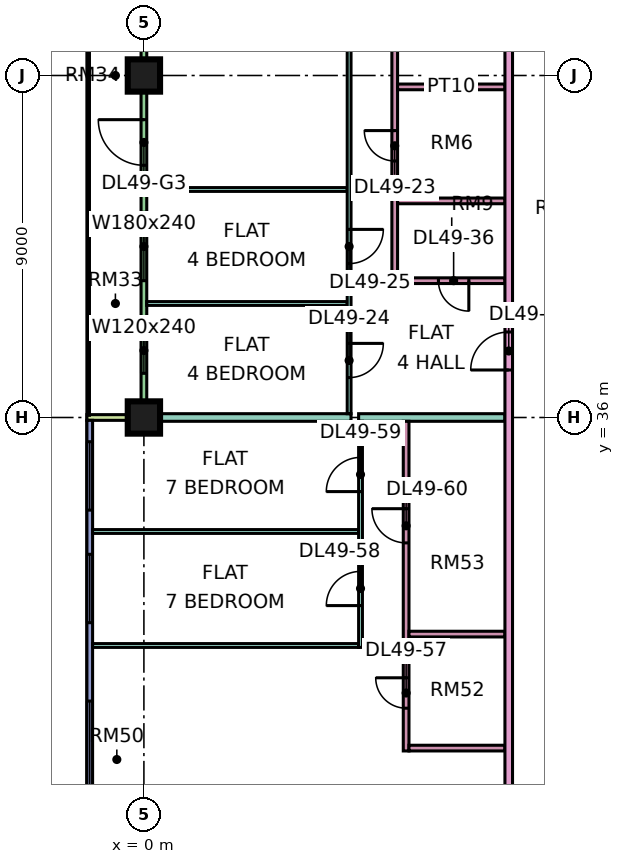
"""IFC4 building model, lengths in metres.
Left out: names, types, materials, properties, quantities, classifications, styles, units other than length and angle.
Written with IfcOpenShell. Run it as: python <this file> out.ifc"""

import sys

from ifc_helpers import new_model, si_unit, direction, frame, frame_2d, origin, origin_2d, place, context, subcontext, project, spatial, rectangle, extrude, element, fill, save


model = new_model("IFC4")
c1 = context("Model", 3, precision=1e-05, world=origin(), true_north=direction((0.0, 1.0)))
c2 = subcontext(c1, "Body", "Model", "MODEL_VIEW")
j1 = project(units=[si_unit("LENGTHUNIT", "METRE"), si_unit("PLANEANGLEUNIT", "RADIAN")], contexts=[c1])
p1 = place(None, origin())
s1 = spatial("IfcSite", under=j1, at=p1, CompositionType="ELEMENT")
p2 = place(p1, origin())
s2 = spatial("IfcBuilding", under=s1, at=p2, CompositionType="ELEMENT")
p3 = place(p2, frame((0.0, 0.0, 211.65)))
s3 = spatial("IfcBuildingStorey", under=s2, at=p3, CompositionType="ELEMENT", Elevation=211.65)
p4 = place(p3, frame((0.0, 36.0, 0.0), z_axis=(0.0, 0.0, 1.0), x_axis=(1.0, 0.0, 0.0)))
e1 = element("IfcColumn", 1, at=p4, inside=s3, PredefinedType="COLUMN", context=c2, shape_type="SweptSolid", body=[
    extrude(rectangle(XDim=0.85, YDim=0.85, at=origin_2d()), origin(), (0.0, 0.0, 1.0), 3.75),
])
p5 = place(p3, frame((0.0, 45.0, 0.0), z_axis=(0.0, 0.0, 1.0), x_axis=(1.0, 0.0, 0.0)))
e2 = element("IfcColumn", 2, at=p5, inside=s3, PredefinedType="COLUMN", context=c2, shape_type="SweptSolid", body=[
    extrude(rectangle(XDim=0.85, YDim=0.85, at=origin_2d()), origin(), (0.0, 0.0, 1.0), 3.75),
])
p6 = place(p3, frame((0.0, 47.925, 0.0), z_axis=(0.0, 0.0, 1.0), x_axis=(0.0, -1.0, 0.0)))
e3 = element("IfcWall", 3, at=p6, inside=s3, PredefinedType="SOLIDWALL", context=c2, shape_type="SweptSolid", body=[
    extrude(rectangle(XDim=11.85, YDim=0.15, at=frame_2d((5.925, 0.0))), origin(), (0.0, 0.0, 1.0), 3.35),
])
p7 = place(p6, frame((0.6, 0.0, 0.45)))
e4 = element("IfcOpeningElement", 4, at=p7, cuts=e3, PredefinedType="OPENING", context=c2, shape_type="SweptSolid", body=[
    extrude(rectangle(XDim=1.2, YDim=2.4, at=frame_2d((0.6, 1.2))), frame((0.0, 0.085, 0.0), z_axis=(0.0, -1.0, 0.0), x_axis=(1.0, 0.0, 0.0)), (0.0, 0.0, 1.0), 0.17),
])
p8 = place(p6, frame((4.087, 0.0, 0.0)))
e5 = element("IfcOpeningElement", 5, at=p8, cuts=e3, PredefinedType="OPENING", context=c2, shape_type="SweptSolid", body=[
    extrude(rectangle(XDim=1.2, YDim=2.4, at=frame_2d((0.6, 1.2))), frame((0.0, 0.085, 0.0), z_axis=(0.0, -1.0, 0.0), x_axis=(1.0, 0.0, 0.0)), (0.0, 0.0, 1.0), 0.17),
])
p9 = place(p6, frame((6.525, 0.0, 0.45)))
e6 = element("IfcOpeningElement", 6, at=p9, cuts=e3, PredefinedType="OPENING", context=c2, shape_type="SweptSolid", body=[
    extrude(rectangle(XDim=1.8, YDim=2.4, at=frame_2d((0.9, 1.2))), frame((0.0, 0.085, 0.0), z_axis=(0.0, -1.0, 0.0), x_axis=(1.0, 0.0, 0.0)), (0.0, 0.0, 1.0), 0.17),
])
p10 = place(p6, frame((9.562, 0.0, 0.45)))
e7 = element("IfcOpeningElement", 7, at=p10, cuts=e3, PredefinedType="OPENING", context=c2, shape_type="SweptSolid", body=[
    extrude(rectangle(XDim=1.2, YDim=2.4, at=frame_2d((0.6, 1.2))), frame((0.0, 0.085, 0.0), z_axis=(0.0, -1.0, 0.0), x_axis=(1.0, 0.0, 0.0)), (0.0, 0.0, 1.0), 0.17),
])
p11 = place(p3, frame((-1.5, 36.0, 0.0), z_axis=(0.0, 0.0, 1.0), x_axis=(1.0, 0.0, 0.0)))
e8 = element("IfcWall", 8, at=p11, inside=s3, PredefinedType="SOLIDWALL", context=c2, shape_type="SweptSolid", body=[
    extrude(rectangle(XDim=1.5, YDim=0.15, at=frame_2d((0.75, 0.0))), origin(), (0.0, 0.0, 1.0), 3.35),
])
p12 = place(p3, frame((-1.425, 35.925, 0.0), z_axis=(0.0, 0.0, 1.0), x_axis=(0.0, -1.0, 0.0)))
e9 = element("IfcWall", 9, at=p12, inside=s3, PredefinedType="SOLIDWALL", context=c2, shape_type="SweptSolid", body=[
    extrude(rectangle(XDim=11.85, YDim=0.15, at=frame_2d((5.925, 0.0))), origin(), (0.0, 0.0, 1.0), 3.35),
])
p13 = place(p12, frame((0.562, 0.0, 0.45)))
e10 = element("IfcOpeningElement", 10, at=p13, cuts=e9, PredefinedType="OPENING", context=c2, shape_type="SweptSolid", body=[
    extrude(rectangle(XDim=1.8, YDim=2.4, at=frame_2d((0.9, 1.2))), frame((0.0, 0.085, 0.0), z_axis=(0.0, -1.0, 0.0), x_axis=(1.0, 0.0, 0.0)), (0.0, 0.0, 1.0), 0.17),
])
p14 = place(p12, frame((3.525, 0.0, 0.45)))
e11 = element("IfcOpeningElement", 11, at=p14, cuts=e9, PredefinedType="OPENING", context=c2, shape_type="SweptSolid", body=[
    extrude(rectangle(XDim=1.8, YDim=2.4, at=frame_2d((0.9, 1.2))), frame((0.0, 0.085, 0.0), z_axis=(0.0, -1.0, 0.0), x_axis=(1.0, 0.0, 0.0)), (0.0, 0.0, 1.0), 0.17),
])
p15 = place(p12, frame((7.387, 0.0, 0.45)))
e12 = element("IfcOpeningElement", 12, at=p15, cuts=e9, PredefinedType="OPENING", context=c2, shape_type="SweptSolid", body=[
    extrude(rectangle(XDim=3.0, YDim=2.4, at=frame_2d((1.5, 1.2))), frame((0.0, 0.085, 0.0), z_axis=(0.0, -1.0, 0.0), x_axis=(1.0, 0.0, 0.0)), (0.0, 0.0, 1.0), 0.17),
])
p16 = place(p3, frame((-1.351, 33.0, 0.0), z_axis=(0.0, 0.0, 1.0), x_axis=(1.0, 0.0, 0.0)))
e13 = element("IfcWall", 13, at=p16, inside=s3, PredefinedType="PARTITIONING", context=c2, shape_type="SweptSolid", body=[
    extrude(rectangle(XDim=7.001, YDim=0.1, at=frame_2d((3.5, 0.0))), origin(), (0.0, 0.0, 1.0), 3.35),
])
p17 = place(p3, frame((-1.35, 30.0, 0.0), z_axis=(0.0, 0.0, 1.0), x_axis=(1.0, 0.0, 0.0)))
e14 = element("IfcWall", 14, at=p17, inside=s3, PredefinedType="PARTITIONING", context=c2, shape_type="SweptSolid", body=[
    extrude(rectangle(XDim=7.0, YDim=0.1, at=frame_2d((3.5, 0.0))), origin(), (0.0, 0.0, 1.0), 3.35),
])
e15 = element("IfcWall", 15, at=p4, inside=s3, PredefinedType="PARTITIONING", context=c2, shape_type="SweptSolid", body=[
    extrude(rectangle(XDim=5.45, YDim=0.2, at=frame_2d((2.725, 0.0))), origin(), (0.0, 0.0, 1.0), 3.35),
])
for number, where, z_axis, x_axis in (
    (16, (0.074, 39.0, 0.0), (0.0, 0.0, 1.0), (1.0, 0.0, 0.0)),
    (17, (0.074, 42.0, 0.0), (0.0, 0.0, 1.0), (1.0, 0.0, 0.0)),
):
    element("IfcWall", number, at=place(p3, frame(where, z_axis=z_axis, x_axis=x_axis)), inside=s3, PredefinedType="PARTITIONING", context=c2, shape_type="SweptSolid", body=[
        extrude(rectangle(XDim=5.276, YDim=0.1, at=frame_2d((2.638, 0.0))), origin(), (0.0, 0.0, 1.0), 3.35),
    ])
p18 = place(p3, frame((5.4, 36.1, 0.0), z_axis=(0.0, 0.0, 1.0), x_axis=(0.0, 1.0, 0.0)))
e18 = element("IfcWall", 18, at=p18, inside=s3, PredefinedType="PARTITIONING", context=c2, shape_type="SweptSolid", body=[
    extrude(rectangle(XDim=26.95, YDim=0.1, at=frame_2d((13.475, 0.0))), origin(), (0.0, 0.0, 1.0), 3.35),
])
p19 = place(p18, frame((0.95, 0.0, 0.0)))
e19 = element("IfcOpeningElement", 19, at=p19, cuts=e18, PredefinedType="OPENING", context=c2, shape_type="SweptSolid", body=[
    extrude(rectangle(XDim=0.9, YDim=2.1, at=frame_2d((0.45, 1.05))), frame((0.0, 0.06, 0.0), z_axis=(0.0, -1.0, 0.0), x_axis=(1.0, 0.0, 0.0)), (0.0, 0.0, 1.0), 0.12),
])
p20 = place(p18, frame((3.95, 0.0, 0.0)))
e20 = element("IfcOpeningElement", 20, at=p20, cuts=e18, PredefinedType="OPENING", context=c2, shape_type="SweptSolid", body=[
    extrude(rectangle(XDim=0.9, YDim=2.1, at=frame_2d((0.45, 1.05))), frame((0.0, 0.06, 0.0), z_axis=(0.0, -1.0, 0.0), x_axis=(1.0, 0.0, 0.0)), (0.0, 0.0, 1.0), 0.12),
])
p21 = place(p18, frame((15.95, 0.0, 0.0)))
e21 = element("IfcOpeningElement", 21, at=p21, cuts=e18, PredefinedType="OPENING", context=c2, shape_type="SweptSolid", body=[
    extrude(rectangle(XDim=0.9, YDim=2.1, at=frame_2d((0.45, 1.05))), frame((0.0, 0.06, 0.0), z_axis=(0.0, -1.0, 0.0), x_axis=(1.0, 0.0, 0.0)), (0.0, 0.0, 1.0), 0.12),
])
p22 = place(p18, frame((18.95, 0.0, 0.0)))
e22 = element("IfcOpeningElement", 22, at=p22, cuts=e18, PredefinedType="OPENING", context=c2, shape_type="SweptSolid", body=[
    extrude(rectangle(XDim=0.9, YDim=2.1, at=frame_2d((0.45, 1.05))), frame((0.0, 0.06, 0.0), z_axis=(0.0, -1.0, 0.0), x_axis=(1.0, 0.0, 0.0)), (0.0, 0.0, 1.0), 0.12),
])
p23 = place(p18, frame((21.95, 0.0, 0.0)))
e23 = element("IfcOpeningElement", 23, at=p23, cuts=e18, PredefinedType="OPENING", context=c2, shape_type="SweptSolid", body=[
    extrude(rectangle(XDim=0.9, YDim=2.1, at=frame_2d((0.45, 1.05))), frame((0.0, 0.06, 0.0), z_axis=(0.0, -1.0, 0.0), x_axis=(1.0, 0.0, 0.0)), (0.0, 0.0, 1.0), 0.12),
])
p24 = place(p18, frame((9.95, 0.0, 0.0)))
e24 = element("IfcOpeningElement", 24, at=p24, cuts=e18, PredefinedType="OPENING", context=c2, shape_type="SweptSolid", body=[
    extrude(rectangle(XDim=0.9, YDim=2.1, at=frame_2d((0.45, 1.05))), frame((0.0, 0.06, 0.0), z_axis=(0.0, -1.0, 0.0), x_axis=(1.0, 0.0, 0.0)), (0.0, 0.0, 1.0), 0.12),
])
p25 = place(p18, frame((24.55, 0.0, 0.0)))
e25 = element("IfcOpeningElement", 25, at=p25, cuts=e18, PredefinedType="OPENING", context=c2, shape_type="SweptSolid", body=[
    extrude(rectangle(XDim=1.6, YDim=2.1, at=frame_2d((0.8, 1.05))), frame((0.0, 0.06, 0.0), z_axis=(0.0, -1.0, 0.0), x_axis=(1.0, 0.0, 0.0)), (0.0, 0.0, 1.0), 0.12),
])
p26 = place(p3, frame((5.65, 36.0, 0.0), z_axis=(0.0, 0.0, 1.0), x_axis=(1.0, 0.0, 0.0)))
e26 = element("IfcWall", 26, at=p26, inside=s3, PredefinedType="PARTITIONING", context=c2, shape_type="SweptSolid", body=[
    extrude(rectangle(XDim=3.85, YDim=0.2, at=frame_2d((1.925, 0.0))), origin(), (0.0, 0.0, 1.0), 3.35),
])
p27 = place(p3, frame((5.7, 29.95, 0.0), z_axis=(0.0, 0.0, 1.0), x_axis=(0.0, 1.0, 0.0)))
e27 = element("IfcWall", 27, at=p27, inside=s3, PredefinedType="PARTITIONING", context=c2, shape_type="SweptSolid", body=[
    extrude(rectangle(XDim=5.95, YDim=0.1, at=frame_2d((2.975, 0.0))), origin(), (0.0, 0.0, 1.0), 3.35),
])
p28 = place(p27, frame((1.1, 0.0, 0.0)))
e28 = element("IfcOpeningElement", 28, at=p28, cuts=e27, PredefinedType="OPENING", context=c2, shape_type="SweptSolid", body=[
    extrude(rectangle(XDim=0.9, YDim=2.1, at=frame_2d((0.45, 1.05))), frame((0.0, 0.06, 0.0), z_axis=(0.0, -1.0, 0.0), x_axis=(1.0, 0.0, 0.0)), (0.0, 0.0, 1.0), 0.12),
])
p29 = place(p27, frame((4.1, 0.0, 0.0)))
e29 = element("IfcOpeningElement", 29, at=p29, cuts=e27, PredefinedType="OPENING", context=c2, shape_type="SweptSolid", body=[
    extrude(rectangle(XDim=0.9, YDim=2.1, at=frame_2d((0.45, 1.05))), frame((0.0, 0.06, 0.0), z_axis=(0.0, -1.0, 0.0), x_axis=(1.0, 0.0, 0.0)), (0.0, 0.0, 1.0), 0.12),
])
p30 = place(p3, frame((6.6, 39.525, 0.0), z_axis=(0.0, 0.0, 1.0), x_axis=(0.0, 1.0, 0.0)))
e30 = element("IfcWall", 30, at=p30, inside=s3, PredefinedType="PARTITIONING", context=c2, shape_type="SweptSolid", body=[
    extrude(rectangle(XDim=24.825, YDim=0.15, at=frame_2d((12.413, 0.0))), origin(), (0.0, 0.0, 1.0), 3.35),
])
p31 = place(p30, frame((3.225, 0.0, 0.0)))
e31 = element("IfcOpeningElement", 31, at=p31, cuts=e30, PredefinedType="OPENING", context=c2, shape_type="SweptSolid", body=[
    extrude(rectangle(XDim=0.8, YDim=2.1, at=frame_2d((0.4, 1.05))), frame((0.0, 0.085, 0.0), z_axis=(0.0, -1.0, 0.0), x_axis=(1.0, 0.0, 0.0)), (0.0, 0.0, 1.0), 0.17),
])
p32 = place(p30, frame((13.875, 0.0, 0.0)))
e32 = element("IfcOpeningElement", 32, at=p32, cuts=e30, PredefinedType="OPENING", context=c2, shape_type="SweptSolid", body=[
    extrude(rectangle(XDim=0.9, YDim=2.1, at=frame_2d((0.45, 1.05))), frame((0.0, 0.085, 0.0), z_axis=(0.0, -1.0, 0.0), x_axis=(1.0, 0.0, 0.0)), (0.0, 0.0, 1.0), 0.17),
])
p33 = place(p30, frame((6.225, 0.0, 0.0)))
e33 = element("IfcOpeningElement", 33, at=p33, cuts=e30, PredefinedType="OPENING", context=c2, shape_type="SweptSolid", body=[
    extrude(rectangle(XDim=0.8, YDim=2.1, at=frame_2d((0.4, 1.05))), frame((0.0, 0.085, 0.0), z_axis=(0.0, -1.0, 0.0), x_axis=(1.0, 0.0, 0.0)), (0.0, 0.0, 1.0), 0.17),
])
p34 = place(p30, frame((18.525, 0.0, 0.0)))
e34 = element("IfcOpeningElement", 34, at=p34, cuts=e30, PredefinedType="OPENING", context=c2, shape_type="SweptSolid", body=[
    extrude(rectangle(XDim=0.9, YDim=2.1, at=frame_2d((0.45, 1.05))), frame((0.0, 0.085, 0.0), z_axis=(0.0, -1.0, 0.0), x_axis=(1.0, 0.0, 0.0)), (0.0, 0.0, 1.0), 0.17),
])
p35 = place(p30, frame((21.675, 0.0, 0.0)))
e35 = element("IfcOpeningElement", 35, at=p35, cuts=e30, PredefinedType="OPENING", context=c2, shape_type="SweptSolid", body=[
    extrude(rectangle(XDim=0.9, YDim=2.1, at=frame_2d((0.45, 1.05))), frame((0.0, 0.085, 0.0), z_axis=(0.0, -1.0, 0.0), x_axis=(1.0, 0.0, 0.0)), (0.0, 0.0, 1.0), 0.17),
])
p36 = place(p30, frame((9.375, 0.0, 0.0)))
e36 = element("IfcOpeningElement", 36, at=p36, cuts=e30, PredefinedType="OPENING", context=c2, shape_type="SweptSolid", body=[
    extrude(rectangle(XDim=0.8, YDim=2.1, at=frame_2d((0.4, 1.05))), frame((0.0, 0.085, 0.0), z_axis=(0.0, -1.0, 0.0), x_axis=(1.0, 0.0, 0.0)), (0.0, 0.0, 1.0), 0.17),
])
p37 = place(p3, frame((6.675, 39.6, 0.0), z_axis=(0.0, 0.0, 1.0), x_axis=(1.0, 0.0, 0.0)))
e37 = element("IfcWall", 37, at=p37, inside=s3, PredefinedType="PARTITIONING", context=c2, shape_type="SweptSolid", body=[
    extrude(rectangle(XDim=2.825, YDim=0.15, at=frame_2d((1.413, 0.0))), origin(), (0.0, 0.0, 1.0), 3.35),
])
p38 = place(p37, frame((1.075, 0.0, 0.0)))
e38 = element("IfcOpeningElement", 38, at=p38, cuts=e37, PredefinedType="OPENING", context=c2, shape_type="SweptSolid", body=[
    extrude(rectangle(XDim=0.8, YDim=2.1, at=frame_2d((0.4, 1.05))), frame((0.0, 0.085, 0.0), z_axis=(0.0, -1.0, 0.0), x_axis=(1.0, 0.0, 0.0)), (0.0, 0.0, 1.0), 0.17),
])
for number, where, z_axis, x_axis in (
    (39, (6.675, 41.7, 0.0), (0.0, 0.0, 1.0), (1.0, 0.0, 0.0)),
    (40, (6.675, 44.7, 0.0), (0.0, 0.0, 1.0), (1.0, 0.0, 0.0)),
):
    element("IfcWall", number, at=place(p3, frame(where, z_axis=z_axis, x_axis=x_axis)), inside=s3, PredefinedType="PARTITIONING", context=c2, shape_type="SweptSolid", body=[
        extrude(rectangle(XDim=2.825, YDim=0.15, at=frame_2d((1.413, 0.0))), origin(), (0.0, 0.0, 1.0), 3.35),
    ])
p39 = place(p3, frame((6.9, 27.225, 0.0), z_axis=(0.0, 0.0, 1.0), x_axis=(0.0, 1.0, 0.0)))
e41 = element("IfcWall", 41, at=p39, inside=s3, PredefinedType="PARTITIONING", context=c2, shape_type="SweptSolid", body=[
    extrude(rectangle(XDim=8.675, YDim=0.15, at=frame_2d((4.337, 0.0))), origin(), (0.0, 0.0, 1.0), 3.35),
])
p40 = place(p39, frame((1.125, 0.0, 0.0)))
e42 = element("IfcOpeningElement", 42, at=p40, cuts=e41, PredefinedType="OPENING", context=c2, shape_type="SweptSolid", body=[
    extrude(rectangle(XDim=0.8, YDim=2.1, at=frame_2d((0.4, 1.05))), frame((0.0, 0.085, 0.0), z_axis=(0.0, -1.0, 0.0), x_axis=(1.0, 0.0, 0.0)), (0.0, 0.0, 1.0), 0.17),
])
p41 = place(p39, frame((5.475, 0.0, 0.0)))
e43 = element("IfcOpeningElement", 43, at=p41, cuts=e41, PredefinedType="OPENING", context=c2, shape_type="SweptSolid", body=[
    extrude(rectangle(XDim=0.9, YDim=2.1, at=frame_2d((0.45, 1.05))), frame((0.0, 0.085, 0.0), z_axis=(0.0, -1.0, 0.0), x_axis=(1.0, 0.0, 0.0)), (0.0, 0.0, 1.0), 0.17),
])
for number, where, z_axis, x_axis in (
    (44, (6.975, 27.3, 0.0), (0.0, 0.0, 1.0), (1.0, 0.0, 0.0)),
    (45, (6.975, 30.3, 0.0), (0.0, 0.0, 1.0), (1.0, 0.0, 0.0)),
):
    element("IfcWall", number, at=place(p3, frame(where, z_axis=z_axis, x_axis=x_axis)), inside=s3, PredefinedType="PARTITIONING", context=c2, shape_type="SweptSolid", body=[
        extrude(rectangle(XDim=2.525, YDim=0.15, at=frame_2d((1.262, 0.0))), origin(), (0.0, 0.0, 1.0), 3.35),
    ])
p42 = place(p3, frame((9.6, 20.0, 0.0), z_axis=(0.0, 0.0, 1.0), x_axis=(0.0, 1.0, 0.0)))
e46 = element("IfcWall", 46, at=p42, inside=s3, PredefinedType="PARTITIONING", context=c2, shape_type="SweptSolid", body=[
    extrude(rectangle(XDim=44.35, YDim=0.2, at=frame_2d((22.175, 0.0))), origin(), (0.0, 0.0, 1.0), 3.35),
])
p43 = place(p42, frame((17.25, 0.0, 0.0)))
e47 = element("IfcOpeningElement", 47, at=p43, cuts=e46, PredefinedType="OPENING", context=c2, shape_type="SweptSolid", body=[
    extrude(rectangle(XDim=1.0, YDim=2.1, at=frame_2d((0.5, 1.05))), frame((0.0, 0.11, 0.0), z_axis=(0.0, -1.0, 0.0), x_axis=(1.0, 0.0, 0.0)), (0.0, 0.0, 1.0), 0.22),
])
p44 = place(p42, frame((0.6, 0.0, 0.0)))
e48 = element("IfcOpeningElement", 48, at=p44, cuts=e46, PredefinedType="OPENING", context=c2, shape_type="SweptSolid", body=[
    extrude(rectangle(XDim=1.2, YDim=2.1, at=frame_2d((0.6, 1.05))), frame((0.0, 0.11, 0.0), z_axis=(0.0, -1.0, 0.0), x_axis=(1.0, 0.0, 0.0)), (0.0, 0.0, 1.0), 0.22),
])
p45 = place(p42, frame((4.35, 0.0, 0.0)))
e49 = element("IfcOpeningElement", 49, at=p45, cuts=e46, PredefinedType="OPENING", context=c2, shape_type="SweptSolid", body=[
    extrude(rectangle(XDim=1.0, YDim=2.1, at=frame_2d((0.5, 1.05))), frame((0.0, 0.11, 0.0), z_axis=(0.0, -1.0, 0.0), x_axis=(1.0, 0.0, 0.0)), (0.0, 0.0, 1.0), 0.22),
])
p46 = place(p8, frame((1.2, 0.0, 0.0), z_axis=(0.0, 0.0, 1.0), x_axis=(-1.0, 0.0, 0.0)))
e50 = element("IfcDoor", 50, at=p46, inside=s3, OperationType="DOUBLE_DOOR_SINGLE_SWING", PredefinedType="DOOR", context=c2, shape_type="SweptSolid", body=[
    extrude(rectangle(XDim=1.2, YDim=2.4, at=frame_2d((0.6, 1.2))), frame((0.0, 0.025, 0.0), z_axis=(0.0, -1.0, 0.0), x_axis=(1.0, 0.0, 0.0)), (0.0, 0.0, 1.0), 0.05),
])
fill(e5, e50)
p47 = place(p9, origin())
e51 = element("IfcWindow", 51, at=p47, inside=s3, PartitioningType="SINGLE_PANEL", PredefinedType="WINDOW", context=c2, shape_type="SweptSolid", body=[
    extrude(rectangle(XDim=1.8, YDim=2.4, at=frame_2d((0.9, 1.2))), frame((0.0, 0.03, 0.0), z_axis=(0.0, -1.0, 0.0), x_axis=(1.0, 0.0, 0.0)), (0.0, 0.0, 1.0), 0.06),
])
fill(e6, e51)
p48 = place(p10, origin())
e52 = element("IfcWindow", 52, at=p48, inside=s3, PartitioningType="SINGLE_PANEL", PredefinedType="WINDOW", context=c2, shape_type="SweptSolid", body=[
    extrude(rectangle(XDim=1.2, YDim=2.4, at=frame_2d((0.6, 1.2))), frame((0.0, 0.03, 0.0), z_axis=(0.0, -1.0, 0.0), x_axis=(1.0, 0.0, 0.0)), (0.0, 0.0, 1.0), 0.06),
])
fill(e7, e52)
p49 = place(p13, origin())
e53 = element("IfcWindow", 53, at=p49, inside=s3, PartitioningType="SINGLE_PANEL", PredefinedType="WINDOW", context=c2, shape_type="SweptSolid", body=[
    extrude(rectangle(XDim=1.8, YDim=2.4, at=frame_2d((0.9, 1.2))), frame((0.0, 0.03, 0.0), z_axis=(0.0, -1.0, 0.0), x_axis=(1.0, 0.0, 0.0)), (0.0, 0.0, 1.0), 0.06),
])
fill(e10, e53)
p50 = place(p14, origin())
e54 = element("IfcWindow", 54, at=p50, inside=s3, PartitioningType="SINGLE_PANEL", PredefinedType="WINDOW", context=c2, shape_type="SweptSolid", body=[
    extrude(rectangle(XDim=1.8, YDim=2.4, at=frame_2d((0.9, 1.2))), frame((0.0, 0.03, 0.0), z_axis=(0.0, -1.0, 0.0), x_axis=(1.0, 0.0, 0.0)), (0.0, 0.0, 1.0), 0.06),
])
fill(e11, e54)
p51 = place(p15, origin())
e55 = element("IfcWindow", 55, at=p51, inside=s3, PartitioningType="SINGLE_PANEL", PredefinedType="WINDOW", context=c2, shape_type="SweptSolid", body=[
    extrude(rectangle(XDim=3.0, YDim=2.4, at=frame_2d((1.5, 1.2))), frame((0.0, 0.03, 0.0), z_axis=(0.0, -1.0, 0.0), x_axis=(1.0, 0.0, 0.0)), (0.0, 0.0, 1.0), 0.06),
])
fill(e12, e55)
p52 = place(p31, frame((0.8, 0.0, 0.0), z_axis=(0.0, 0.0, 1.0), x_axis=(-1.0, 0.0, 0.0)))
e56 = element("IfcDoor", 56, at=p52, inside=s3, OperationType="SINGLE_SWING_RIGHT", PredefinedType="DOOR", context=c2, shape_type="SweptSolid", body=[
    extrude(rectangle(XDim=0.8, YDim=2.1, at=frame_2d((0.4, 1.05))), frame((0.0, 0.025, 0.0), z_axis=(0.0, -1.0, 0.0), x_axis=(1.0, 0.0, 0.0)), (0.0, 0.0, 1.0), 0.05),
])
fill(e31, e56)
p53 = place(p19, origin())
e57 = element("IfcDoor", 57, at=p53, inside=s3, OperationType="SINGLE_SWING_RIGHT", PredefinedType="DOOR", context=c2, shape_type="SweptSolid", body=[
    extrude(rectangle(XDim=0.9, YDim=2.1, at=frame_2d((0.45, 1.05))), frame((0.0, 0.025, 0.0), z_axis=(0.0, -1.0, 0.0), x_axis=(1.0, 0.0, 0.0)), (0.0, 0.0, 1.0), 0.05),
])
fill(e19, e57)
p54 = place(p20, origin())
e58 = element("IfcDoor", 58, at=p54, inside=s3, OperationType="SINGLE_SWING_RIGHT", PredefinedType="DOOR", context=c2, shape_type="SweptSolid", body=[
    extrude(rectangle(XDim=0.9, YDim=2.1, at=frame_2d((0.45, 1.05))), frame((0.0, 0.025, 0.0), z_axis=(0.0, -1.0, 0.0), x_axis=(1.0, 0.0, 0.0)), (0.0, 0.0, 1.0), 0.05),
])
fill(e20, e58)
p55 = place(p43, origin())
e59 = element("IfcDoor", 59, at=p55, inside=s3, OperationType="SINGLE_SWING_LEFT", PredefinedType="DOOR", context=c2, shape_type="SweptSolid", body=[
    extrude(rectangle(XDim=1.0, YDim=2.1, at=frame_2d((0.5, 1.05))), frame((0.0, 0.025, 0.0), z_axis=(0.0, -1.0, 0.0), x_axis=(1.0, 0.0, 0.0)), (0.0, 0.0, 1.0), 0.05),
])
fill(e47, e59)
p56 = place(p38, origin())
e60 = element("IfcDoor", 60, at=p56, inside=s3, OperationType="SINGLE_SWING_RIGHT", PredefinedType="DOOR", context=c2, shape_type="SweptSolid", body=[
    extrude(rectangle(XDim=0.8, YDim=2.1, at=frame_2d((0.4, 1.05))), frame((0.0, 0.025, 0.0), z_axis=(0.0, -1.0, 0.0), x_axis=(1.0, 0.0, 0.0)), (0.0, 0.0, 1.0), 0.05),
])
fill(e38, e60)
p57 = place(p40, frame((0.8, 0.0, 0.0), z_axis=(0.0, 0.0, 1.0), x_axis=(-1.0, 0.0, 0.0)))
e61 = element("IfcDoor", 61, at=p57, inside=s3, OperationType="SINGLE_SWING_RIGHT", PredefinedType="DOOR", context=c2, shape_type="SweptSolid", body=[
    extrude(rectangle(XDim=0.8, YDim=2.1, at=frame_2d((0.4, 1.05))), frame((0.0, 0.025, 0.0), z_axis=(0.0, -1.0, 0.0), x_axis=(1.0, 0.0, 0.0)), (0.0, 0.0, 1.0), 0.05),
])
fill(e42, e61)
p58 = place(p28, origin())
e62 = element("IfcDoor", 62, at=p58, inside=s3, OperationType="SINGLE_SWING_LEFT", PredefinedType="DOOR", context=c2, shape_type="SweptSolid", body=[
    extrude(rectangle(XDim=0.9, YDim=2.1, at=frame_2d((0.45, 1.05))), frame((0.0, 0.025, 0.0), z_axis=(0.0, -1.0, 0.0), x_axis=(1.0, 0.0, 0.0)), (0.0, 0.0, 1.0), 0.05),
])
fill(e28, e62)
p59 = place(p29, origin())
e63 = element("IfcDoor", 63, at=p59, inside=s3, OperationType="SINGLE_SWING_LEFT", PredefinedType="DOOR", context=c2, shape_type="SweptSolid", body=[
    extrude(rectangle(XDim=0.9, YDim=2.1, at=frame_2d((0.45, 1.05))), frame((0.0, 0.025, 0.0), z_axis=(0.0, -1.0, 0.0), x_axis=(1.0, 0.0, 0.0)), (0.0, 0.0, 1.0), 0.05),
])
fill(e29, e63)
p60 = place(p41, frame((0.9, 0.0, 0.0), z_axis=(0.0, 0.0, 1.0), x_axis=(-1.0, 0.0, 0.0)))
e64 = element("IfcDoor", 64, at=p60, inside=s3, OperationType="SINGLE_SWING_RIGHT", PredefinedType="DOOR", context=c2, shape_type="SweptSolid", body=[
    extrude(rectangle(XDim=0.9, YDim=2.1, at=frame_2d((0.45, 1.05))), frame((0.0, 0.025, 0.0), z_axis=(0.0, -1.0, 0.0), x_axis=(1.0, 0.0, 0.0)), (0.0, 0.0, 1.0), 0.05),
])
fill(e43, e64)
save(model, sys.argv[1])
